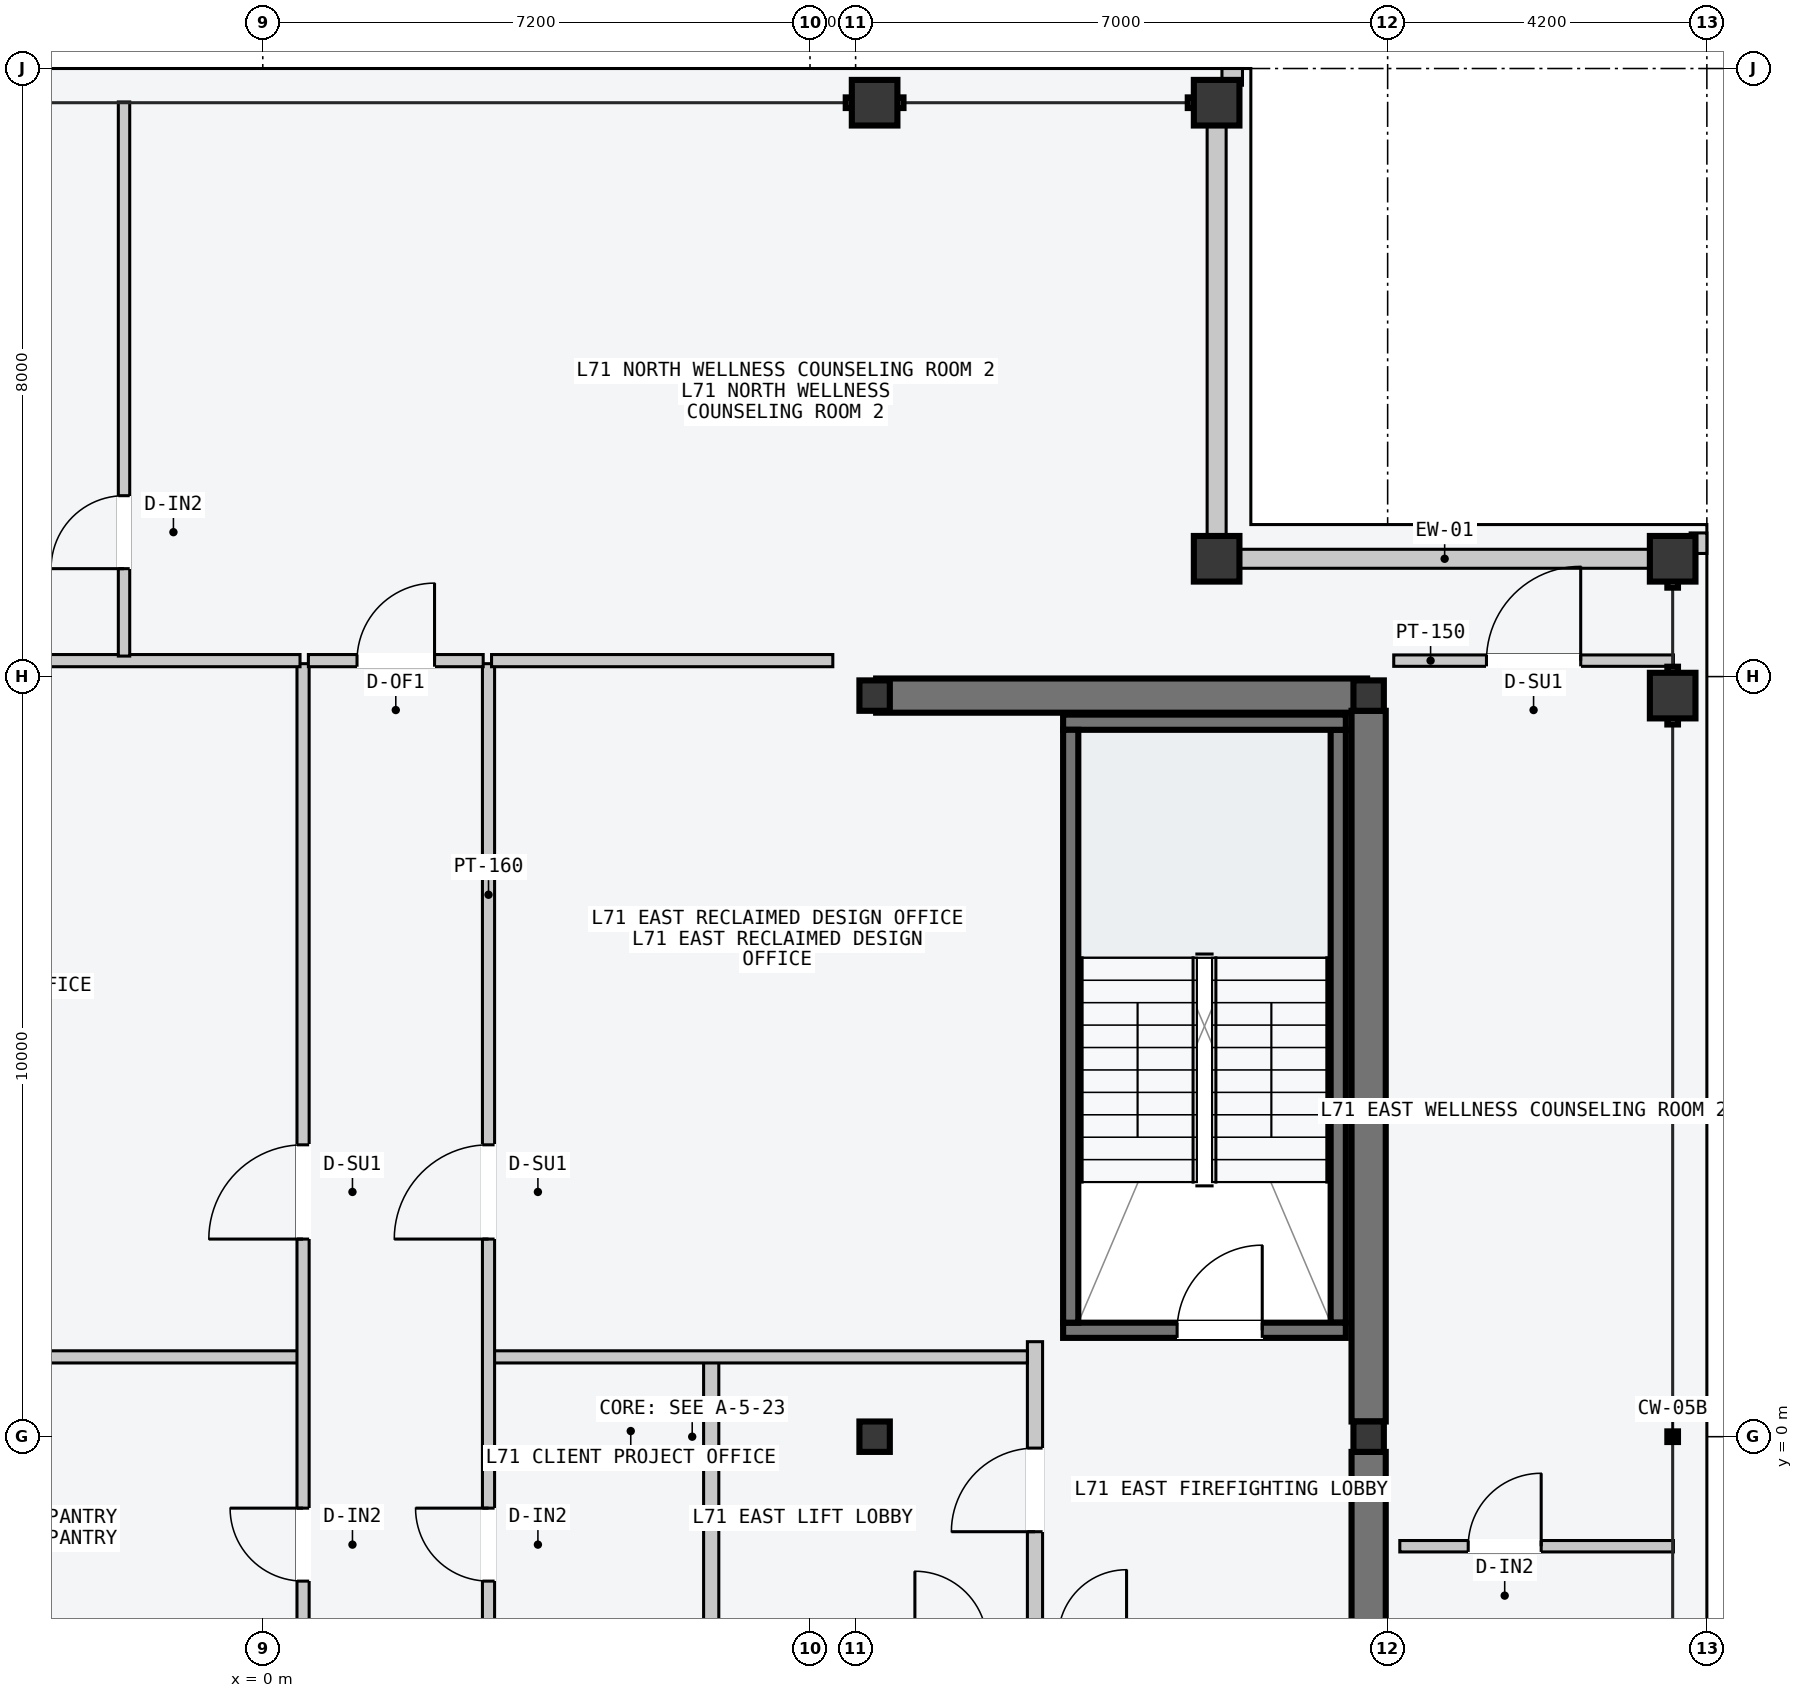
"""IFC4 building model, lengths in metres.
Left out: names, types, materials, properties, quantities, classifications, styles, units other than length and angle.
Written with IfcOpenShell. Run it as: python <this file> out.ifc"""

import sys

from ifc_helpers import new_model, si_unit, direction, frame, frame_2d, origin, origin_2d, place, context, subcontext, project, spatial, rectangle, hollow_rectangle, i_section, extrude, element, fill, save


model = new_model("IFC4")
c1 = context("Model", 3, precision=1e-05, world=origin(), true_north=direction((0.0, 1.0)))
c2 = subcontext(c1, "Body", "Model", "MODEL_VIEW")
j1 = project(units=[si_unit("LENGTHUNIT", "METRE"), si_unit("PLANEANGLEUNIT", "RADIAN")], contexts=[c1])
p1 = place(None, origin())
s1 = spatial("IfcSite", under=j1, at=p1, CompositionType="ELEMENT")
p2 = place(p1, origin())
s2 = spatial("IfcBuilding", under=s1, at=p2, CompositionType="ELEMENT")
p3 = place(p2, frame((0.0, 0.0, 268.8)))
s3 = spatial("IfcBuildingStorey", under=s2, at=p3, CompositionType="ELEMENT", Elevation=268.8)
p4 = place(p3, frame((8.07, 9.75, -0.2), z_axis=(0.0, 0.0, 1.0), x_axis=(1.0, 0.0, 0.0)))
e1 = element("IfcWall", 1, at=p4, inside=s3, PredefinedType="SHEAR", context=c2, shape_type="SweptSolid", body=[
    extrude(rectangle(XDim=6.46, YDim=0.45, at=frame_2d((3.23, 0.0))), origin(), (0.0, 0.0, 1.0), 3.6),
])
for number, where, z_axis, x_axis in (
    (2, (14.55, -9.55, -0.2), (0.0, 0.0, 1.0), (0.0, 1.0, 0.0)),
    (3, (14.55, 0.2, -0.2), (0.0, 0.0, 1.0), (0.0, 1.0, 0.0)),
):
    element("IfcWall", number, at=place(p3, frame(where, z_axis=z_axis, x_axis=x_axis)), inside=s3, PredefinedType="SHEAR", context=c2, shape_type="SweptSolid", body=[
        extrude(rectangle(XDim=9.35, YDim=0.45, at=frame_2d((4.675, 0.0))), origin(), (0.0, 0.0, 1.0), 3.6),
    ])
p5 = place(p3, frame((14.15, 1.5, -0.2), z_axis=(0.0, 0.0, 1.0), x_axis=(0.0, 1.0, 0.0)))
e4 = element("IfcWall", 4, at=p5, inside=s3, PredefinedType="SOLIDWALL", context=c2, shape_type="SweptSolid", body=[
    extrude(rectangle(XDim=7.8, YDim=0.2, at=frame_2d((3.9, 0.0))), origin(), (0.0, 0.0, 1.0), 3.6),
])
p6 = place(p3, frame((10.53, 1.4, -0.2), z_axis=(0.0, 0.0, 1.0), x_axis=(1.0, 0.0, 0.0)))
e5 = element("IfcWall", 5, at=p6, inside=s3, PredefinedType="SOLIDWALL", context=c2, shape_type="SweptSolid", body=[
    extrude(rectangle(XDim=3.72, YDim=0.2, at=frame_2d((1.86, 0.0))), origin(), (0.0, 0.0, 1.0), 3.6),
])
p7 = place(p6, frame((1.5, 0.0, 0.2)))
e6 = element("IfcOpeningElement", 6, at=p7, cuts=e5, PredefinedType="OPENING", context=c2, shape_type="SweptSolid", body=[
    extrude(rectangle(XDim=1.12, YDim=2.18, at=frame_2d((0.56, 1.09))), frame((0.0, 0.11, 0.0), z_axis=(0.0, -1.0, 0.0), x_axis=(1.0, 0.0, 0.0)), (0.0, 0.0, 1.0), 0.22),
])
p8 = place(p3, frame((10.53, 9.4, -0.2), z_axis=(0.0, 0.0, 1.0), x_axis=(1.0, 0.0, 0.0)))
e7 = element("IfcWall", 7, at=p8, inside=s3, PredefinedType="SOLIDWALL", context=c2, shape_type="SweptSolid", body=[
    extrude(rectangle(XDim=3.72, YDim=0.2, at=frame_2d((1.86, 0.0))), origin(), (0.0, 0.0, 1.0), 3.6),
])
p9 = place(p3, frame((10.63, 1.5, -0.2), z_axis=(0.0, 0.0, 1.0), x_axis=(0.0, 1.0, 0.0)))
e8 = element("IfcWall", 8, at=p9, inside=s3, PredefinedType="SOLIDWALL", context=c2, shape_type="SweptSolid", body=[
    extrude(rectangle(XDim=7.8, YDim=0.2, at=frame_2d((3.9, 0.0))), origin(), (0.0, 0.0, 1.0), 3.6),
])
for number, where, z_axis, x_axis in (
    (9, (8.05, 0.0, 0.0), (0.0, 0.0, 1.0), (1.0, 0.0, 0.0)),
    (10, (8.05, 9.75, 0.0), (0.0, 0.0, 1.0), (1.0, 0.0, 0.0)),
    (11, (14.55, 0.0, 0.0), (0.0, 0.0, 1.0), (1.0, 0.0, 0.0)),
    (12, (14.55, 9.75, 0.0), (0.0, 0.0, 1.0), (1.0, 0.0, 0.0)),
):
    element("IfcColumn", number, at=place(p3, frame(where, z_axis=z_axis, x_axis=x_axis)), inside=s3, PredefinedType="COLUMN", context=c2, shape_type="SweptSolid", body=[
        extrude(i_section(OverallWidth=0.4, OverallDepth=0.4, WebThickness=0.013, FlangeThickness=0.021, at=origin_2d()), origin(), (0.0, 0.0, 1.0), 3.6),
    ])
for number, where, z_axis, x_axis in (
    (13, (8.05, 17.55, 0.0), (0.0, 0.0, 1.0), (1.0, 0.0, 0.0)),
    (14, (12.55, 17.55, 0.0), (0.0, 0.0, 1.0), (1.0, 0.0, 0.0)),
    (15, (18.55, 9.75, 0.0), (0.0, 0.0, 1.0), (0.0, 1.0, 0.0)),
    (16, (18.55, 11.55, 0.0), (0.0, 0.0, 1.0), (0.0, 1.0, 0.0)),
    (17, (12.55, 11.55, 0.0), (0.0, 0.0, 1.0), (1.0, 0.0, 0.0)),
):
    element("IfcColumn", number, at=place(p3, frame(where, z_axis=z_axis, x_axis=x_axis)), inside=s3, PredefinedType="COLUMN", context=c2, shape_type="SweptSolid", body=[
        extrude(hollow_rectangle(XDim=0.6, YDim=0.6, WallThickness=0.025, at=origin_2d()), origin(), (0.0, 0.0, 1.0), 3.6),
    ])
for number, where, z_axis, x_axis in (
    (18, (12.86, 11.55, 0.0), (0.0, 0.0, 1.0), (1.0, 0.0, 0.0)),
    (19, (12.55, 11.86, 0.0), (0.0, 0.0, 1.0), (0.0, 1.0, 0.0)),
):
    element("IfcWall", number, at=place(p3, frame(where, z_axis=z_axis, x_axis=x_axis)), inside=s3, PredefinedType="STANDARD", context=c2, shape_type="SweptSolid", body=[
        extrude(rectangle(XDim=5.38, YDim=0.25, at=frame_2d((2.69, 0.0))), origin(), (0.0, 0.0, 1.0), 2.85),
    ])
for number, where, z_axis, x_axis in (
    (20, (12.62, 17.89, 0.0), (0.0, 0.0, 1.0), (1.0, 0.0, 0.0)),
    (21, (18.89, 11.62, 0.0), (0.0, 0.0, 1.0), (0.0, 1.0, 0.0)),
):
    element("IfcWall", number, at=place(p3, frame(where, z_axis=z_axis, x_axis=x_axis)), inside=s3, PredefinedType="PARAPET", context=c2, shape_type="SweptSolid", body=[
        extrude(rectangle(XDim=0.27, YDim=0.22, at=frame_2d((0.135, 0.0))), origin(), (0.0, 0.0, 1.0), 1.2),
    ])
p10 = place(p3, frame((5.9, -9.45, 0.0), z_axis=(0.0, 0.0, 1.0), x_axis=(0.0, 1.0, 0.0)))
e22 = element("IfcWall", 22, at=p10, inside=s3, PredefinedType="PARTITIONING", context=c2, shape_type="SweptSolid", body=[
    extrude(rectangle(XDim=10.5, YDim=0.2, at=frame_2d((5.25, 0.0))), origin(), (0.0, 0.0, 1.0), 3.4),
])
p11 = place(p10, frame((3.9, 0.0, 0.0)))
e23 = element("IfcOpeningElement", 23, at=p11, cuts=e22, PredefinedType="OPENING", context=c2, shape_type="SweptSolid", body=[
    extrude(rectangle(XDim=1.5, YDim=2.2, at=frame_2d((0.75, 1.1))), frame((0.0, 0.11, 0.0), z_axis=(0.0, -1.0, 0.0), x_axis=(1.0, 0.0, 0.0)), (0.0, 0.0, 1.0), 0.22),
])
p12 = place(p3, frame((10.16, -2.55, 0.0), z_axis=(0.0, 0.0, 1.0), x_axis=(0.0, 1.0, 0.0)))
e24 = element("IfcWall", 24, at=p12, inside=s3, PredefinedType="PARTITIONING", context=c2, shape_type="SweptSolid", body=[
    extrude(rectangle(XDim=3.8, YDim=0.2, at=frame_2d((1.9, 0.0))), origin(), (0.0, 0.0, 1.0), 3.4),
])
p13 = place(p12, frame((1.3, 0.0, 0.0)))
e25 = element("IfcOpeningElement", 25, at=p13, cuts=e24, PredefinedType="OPENING", context=c2, shape_type="SweptSolid", body=[
    extrude(rectangle(XDim=1.1, YDim=2.15, at=frame_2d((0.55, 1.075))), frame((0.0, 0.11, 0.0), z_axis=(0.0, -1.0, 0.0), x_axis=(1.0, 0.0, 0.0)), (0.0, 0.0, 1.0), 0.22),
])
p14 = place(p3, frame((-10.05, 1.05, 0.0), z_axis=(0.0, 0.0, 1.0), x_axis=(1.0, 0.0, 0.0)))
e26 = element("IfcWall", 26, at=p14, inside=s3, PredefinedType="PARTITIONING", context=c2, shape_type="SweptSolid", body=[
    extrude(rectangle(XDim=10.54, YDim=0.16, at=frame_2d((5.27, 0.0))), origin(), (0.0, 0.0, 1.0), 3.4),
])
p15 = place(p3, frame((0.53, -3.5, 0.0), z_axis=(0.0, 0.0, 1.0), x_axis=(0.0, 1.0, 0.0)))
e27 = element("IfcWall", 27, at=p15, inside=s3, PredefinedType="PARTITIONING", context=c2, shape_type="SweptSolid", body=[
    extrude(rectangle(XDim=13.67, YDim=0.16, at=frame_2d((6.835, 0.0))), origin(), (0.0, 0.0, 1.0), 3.4),
])
p16 = place(p15, frame((6.1, 0.0, 0.0)))
e28 = element("IfcOpeningElement", 28, at=p16, cuts=e27, PredefinedType="OPENING", context=c2, shape_type="SweptSolid", body=[
    extrude(rectangle(XDim=1.24, YDim=2.24, at=frame_2d((0.62, 1.12))), frame((0.0, 0.09, 0.0), z_axis=(0.0, -1.0, 0.0), x_axis=(1.0, 0.0, 0.0)), (0.0, 0.0, 1.0), 0.18),
])
p17 = place(p15, frame((1.6, 0.0, 0.0)))
e29 = element("IfcOpeningElement", 29, at=p17, cuts=e27, PredefinedType="OPENING", context=c2, shape_type="SweptSolid", body=[
    extrude(rectangle(XDim=0.96, YDim=2.18, at=frame_2d((0.48, 1.09))), frame((0.0, 0.09, 0.0), z_axis=(0.0, -1.0, 0.0), x_axis=(1.0, 0.0, 0.0)), (0.0, 0.0, 1.0), 0.18),
])
p18 = place(p3, frame((-7.5, 10.21, 0.0), z_axis=(0.0, 0.0, 1.0), x_axis=(1.0, 0.0, 0.0)))
e30 = element("IfcWall", 30, at=p18, inside=s3, PredefinedType="PARTITIONING", context=c2, shape_type="SweptSolid", body=[
    extrude(rectangle(XDim=7.99, YDim=0.16, at=frame_2d((3.995, 0.0))), origin(), (0.0, 0.0, 1.0), 3.4),
])
p19 = place(p3, frame((3.01, 1.05, 0.0), z_axis=(0.0, 0.0, 1.0), x_axis=(1.0, 0.0, 0.0)))
e31 = element("IfcWall", 31, at=p19, inside=s3, PredefinedType="PARTITIONING", context=c2, shape_type="SweptSolid", body=[
    extrude(rectangle(XDim=7.05, YDim=0.16, at=frame_2d((3.525, 0.0))), origin(), (0.0, 0.0, 1.0), 3.4),
])
p20 = place(p3, frame((2.97, -3.5, 0.0), z_axis=(0.0, 0.0, 1.0), x_axis=(0.0, 1.0, 0.0)))
e32 = element("IfcWall", 32, at=p20, inside=s3, PredefinedType="PARTITIONING", context=c2, shape_type="SweptSolid", body=[
    extrude(rectangle(XDim=13.67, YDim=0.16, at=frame_2d((6.835, 0.0))), origin(), (0.0, 0.0, 1.0), 3.4),
])
p21 = place(p20, frame((6.1, 0.0, 0.0)))
e33 = element("IfcOpeningElement", 33, at=p21, cuts=e32, PredefinedType="OPENING", context=c2, shape_type="SweptSolid", body=[
    extrude(rectangle(XDim=1.24, YDim=2.24, at=frame_2d((0.62, 1.12))), frame((0.0, 0.09, 0.0), z_axis=(0.0, -1.0, 0.0), x_axis=(1.0, 0.0, 0.0)), (0.0, 0.0, 1.0), 0.18),
])
p22 = place(p20, frame((1.6, 0.0, 0.0)))
e34 = element("IfcOpeningElement", 34, at=p22, cuts=e32, PredefinedType="OPENING", context=c2, shape_type="SweptSolid", body=[
    extrude(rectangle(XDim=0.96, YDim=2.18, at=frame_2d((0.48, 1.09))), frame((0.0, 0.09, 0.0), z_axis=(0.0, -1.0, 0.0), x_axis=(1.0, 0.0, 0.0)), (0.0, 0.0, 1.0), 0.18),
])
p23 = place(p3, frame((3.01, 10.21, 0.0), z_axis=(0.0, 0.0, 1.0), x_axis=(1.0, 0.0, 0.0)))
e35 = element("IfcWall", 35, at=p23, inside=s3, PredefinedType="PARTITIONING", context=c2, shape_type="SweptSolid", body=[
    extrude(rectangle(XDim=4.49, YDim=0.16, at=frame_2d((2.245, 0.0))), origin(), (0.0, 0.0, 1.0), 3.4),
])
p24 = place(p3, frame((-1.826, 10.27, 0.0), z_axis=(0.0, 0.0, 1.0), x_axis=(0.0, 1.0, 0.0)))
e36 = element("IfcWall", 36, at=p24, inside=s3, PredefinedType="PARTITIONING", context=c2, shape_type="SweptSolid", body=[
    extrude(rectangle(XDim=7.29, YDim=0.15, at=frame_2d((3.645, 0.0))), origin(), (0.0, 0.0, 1.0), 3.4),
])
p25 = place(p24, frame((1.15, 0.0, 0.0)))
e37 = element("IfcOpeningElement", 37, at=p25, cuts=e36, PredefinedType="OPENING", context=c2, shape_type="SweptSolid", body=[
    extrude(rectangle(XDim=0.96, YDim=2.18, at=frame_2d((0.48, 1.09))), frame((0.0, 0.085, 0.0), z_axis=(0.0, -1.0, 0.0), x_axis=(1.0, 0.0, 0.0)), (0.0, 0.0, 1.0), 0.17),
])
p26 = place(p3, frame((0.6, 10.21, 0.0), z_axis=(0.0, 0.0, 1.0), x_axis=(1.0, 0.0, 0.0)))
e38 = element("IfcWall", 38, at=p26, inside=s3, PredefinedType="PARTITIONING", context=c2, shape_type="SweptSolid", body=[
    extrude(rectangle(XDim=2.3, YDim=0.16, at=frame_2d((1.15, 0.0))), origin(), (0.0, 0.0, 1.0), 3.4),
])
p27 = place(p26, frame((0.64, 0.0, 0.0)))
e39 = element("IfcOpeningElement", 39, at=p27, cuts=e38, PredefinedType="OPENING", context=c2, shape_type="SweptSolid", body=[
    extrude(rectangle(XDim=1.02, YDim=2.2, at=frame_2d((0.51, 1.1))), frame((0.0, 0.09, 0.0), z_axis=(0.0, -1.0, 0.0), x_axis=(1.0, 0.0, 0.0)), (0.0, 0.0, 1.0), 0.18),
])
p28 = place(p3, frame((14.88, 10.21, 0.0), z_axis=(0.0, 0.0, 1.0), x_axis=(1.0, 0.0, 0.0)))
e40 = element("IfcWall", 40, at=p28, inside=s3, PredefinedType="PARTITIONING", context=c2, shape_type="SweptSolid", body=[
    extrude(rectangle(XDim=3.68, YDim=0.15, at=frame_2d((1.84, 0.0))), origin(), (0.0, 0.0, 1.0), 3.4),
])
p29 = place(p28, frame((1.22, 0.0, 0.0)))
e41 = element("IfcOpeningElement", 41, at=p29, cuts=e40, PredefinedType="OPENING", context=c2, shape_type="SweptSolid", body=[
    extrude(rectangle(XDim=1.24, YDim=2.24, at=frame_2d((0.62, 1.12))), frame((0.0, 0.085, 0.0), z_axis=(0.0, -1.0, 0.0), x_axis=(1.0, 0.0, 0.0)), (0.0, 0.0, 1.0), 0.17),
])
p30 = place(p3, frame((14.96, -1.441, 0.0), z_axis=(0.0, 0.0, 1.0), x_axis=(1.0, 0.0, 0.0)))
e42 = element("IfcWall", 42, at=p30, inside=s3, PredefinedType="PARTITIONING", context=c2, shape_type="SweptSolid", body=[
    extrude(rectangle(XDim=3.6, YDim=0.15, at=frame_2d((1.8, 0.0))), origin(), (0.0, 0.0, 1.0), 3.4),
])
p31 = place(p30, frame((0.9, 0.0, 0.0)))
e43 = element("IfcOpeningElement", 43, at=p31, cuts=e42, PredefinedType="OPENING", context=c2, shape_type="SweptSolid", body=[
    extrude(rectangle(XDim=0.96, YDim=2.18, at=frame_2d((0.48, 1.09))), frame((0.0, 0.085, 0.0), z_axis=(0.0, -1.0, 0.0), x_axis=(1.0, 0.0, 0.0)), (0.0, 0.0, 1.0), 0.17),
])
p32 = place(p7, origin())
e44 = element("IfcDoor", 44, at=p32, inside=s3, OperationType="SINGLE_SWING_RIGHT", PredefinedType="DOOR", context=c2, shape_type="SweptSolid", body=[
    extrude(rectangle(XDim=1.12, YDim=2.18, at=frame_2d((0.56, 1.09))), frame((0.0, 0.025, 0.0), z_axis=(0.0, -1.0, 0.0), x_axis=(1.0, 0.0, 0.0)), (0.0, 0.0, 1.0), 0.05),
])
fill(e6, e44)
p33 = place(p13, origin())
e45 = element("IfcDoor", 45, at=p33, inside=s3, OperationType="SINGLE_SWING_LEFT", PredefinedType="DOOR", context=c2, shape_type="SweptSolid", body=[
    extrude(rectangle(XDim=1.1, YDim=2.15, at=frame_2d((0.55, 1.075))), frame((0.0, 0.025, 0.0), z_axis=(0.0, -1.0, 0.0), x_axis=(1.0, 0.0, 0.0)), (0.0, 0.0, 1.0), 0.05),
])
fill(e25, e45)
p34 = place(p16, origin())
e46 = element("IfcDoor", 46, at=p34, inside=s3, OperationType="SINGLE_SWING_LEFT", PredefinedType="DOOR", context=c2, shape_type="SweptSolid", body=[
    extrude(rectangle(XDim=1.24, YDim=2.24, at=frame_2d((0.62, 1.12))), frame((0.0, 0.025, 0.0), z_axis=(0.0, -1.0, 0.0), x_axis=(1.0, 0.0, 0.0)), (0.0, 0.0, 1.0), 0.05),
])
fill(e28, e46)
p35 = place(p17, origin())
e47 = element("IfcDoor", 47, at=p35, inside=s3, OperationType="SINGLE_SWING_RIGHT", PredefinedType="DOOR", context=c2, shape_type="SweptSolid", body=[
    extrude(rectangle(XDim=0.96, YDim=2.18, at=frame_2d((0.48, 1.09))), frame((0.0, 0.025, 0.0), z_axis=(0.0, -1.0, 0.0), x_axis=(1.0, 0.0, 0.0)), (0.0, 0.0, 1.0), 0.05),
])
fill(e29, e47)
p36 = place(p21, origin())
e48 = element("IfcDoor", 48, at=p36, inside=s3, OperationType="SINGLE_SWING_LEFT", PredefinedType="DOOR", context=c2, shape_type="SweptSolid", body=[
    extrude(rectangle(XDim=1.24, YDim=2.24, at=frame_2d((0.62, 1.12))), frame((0.0, 0.025, 0.0), z_axis=(0.0, -1.0, 0.0), x_axis=(1.0, 0.0, 0.0)), (0.0, 0.0, 1.0), 0.05),
])
fill(e33, e48)
p37 = place(p22, origin())
e49 = element("IfcDoor", 49, at=p37, inside=s3, OperationType="SINGLE_SWING_RIGHT", PredefinedType="DOOR", context=c2, shape_type="SweptSolid", body=[
    extrude(rectangle(XDim=0.96, YDim=2.18, at=frame_2d((0.48, 1.09))), frame((0.0, 0.025, 0.0), z_axis=(0.0, -1.0, 0.0), x_axis=(1.0, 0.0, 0.0)), (0.0, 0.0, 1.0), 0.05),
])
fill(e34, e49)
p38 = place(p25, origin())
e50 = element("IfcDoor", 50, at=p38, inside=s3, OperationType="SINGLE_SWING_LEFT", PredefinedType="DOOR", context=c2, shape_type="SweptSolid", body=[
    extrude(rectangle(XDim=0.96, YDim=2.18, at=frame_2d((0.48, 1.09))), frame((0.0, 0.025, 0.0), z_axis=(0.0, -1.0, 0.0), x_axis=(1.0, 0.0, 0.0)), (0.0, 0.0, 1.0), 0.05),
])
fill(e37, e50)
p39 = place(p27, origin())
e51 = element("IfcDoor", 51, at=p39, inside=s3, OperationType="SINGLE_SWING_RIGHT", PredefinedType="DOOR", context=c2, shape_type="SweptSolid", body=[
    extrude(rectangle(XDim=1.02, YDim=2.2, at=frame_2d((0.51, 1.1))), frame((0.0, 0.025, 0.0), z_axis=(0.0, -1.0, 0.0), x_axis=(1.0, 0.0, 0.0)), (0.0, 0.0, 1.0), 0.05),
])
fill(e39, e51)
p40 = place(p29, origin())
e52 = element("IfcDoor", 52, at=p40, inside=s3, OperationType="SINGLE_SWING_RIGHT", PredefinedType="DOOR", context=c2, shape_type="SweptSolid", body=[
    extrude(rectangle(XDim=1.24, YDim=2.24, at=frame_2d((0.62, 1.12))), frame((0.0, 0.025, 0.0), z_axis=(0.0, -1.0, 0.0), x_axis=(1.0, 0.0, 0.0)), (0.0, 0.0, 1.0), 0.05),
])
fill(e41, e52)
p41 = place(p31, origin())
e53 = element("IfcDoor", 53, at=p41, inside=s3, OperationType="SINGLE_SWING_RIGHT", PredefinedType="DOOR", context=c2, shape_type="SweptSolid", body=[
    extrude(rectangle(XDim=0.96, YDim=2.18, at=frame_2d((0.48, 1.09))), frame((0.0, 0.025, 0.0), z_axis=(0.0, -1.0, 0.0), x_axis=(1.0, 0.0, 0.0)), (0.0, 0.0, 1.0), 0.05),
])
fill(e43, e53)
save(model, sys.argv[1])
